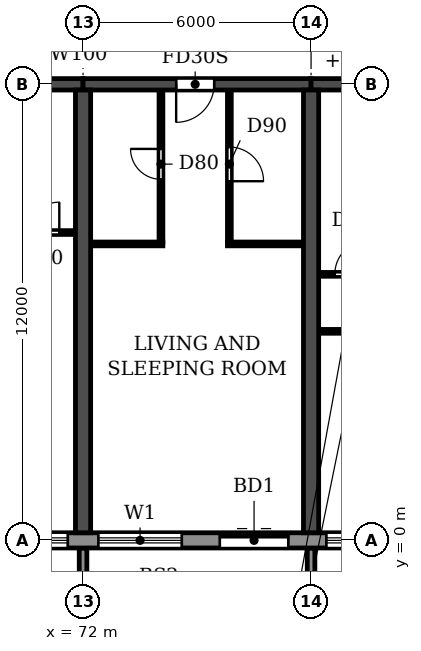
"""IFC4 building model, lengths in metres.
Left out: names, types, materials, properties, quantities, classifications, styles, units other than length and angle.
Written with IfcOpenShell. Run it as: python <this file> out.ifc"""

import sys

from ifc_helpers import new_model, si_unit, direction, frame, frame_2d, origin, place, context, subcontext, project, spatial, polyline, rectangle, outline, extrude, source, transform, mapped, element, fill, save


model = new_model("IFC4")
c1 = context("Model", 3, precision=1e-05, world=origin(), true_north=direction((0.0, 1.0)))
c2 = subcontext(c1, "Body", "Model", "MODEL_VIEW")
j1 = project(units=[si_unit("LENGTHUNIT", "METRE"), si_unit("PLANEANGLEUNIT", "RADIAN")], contexts=[c1])
p1 = place(None, origin())
s1 = spatial("IfcSite", under=j1, at=p1, CompositionType="ELEMENT")
p2 = place(p1, origin())
s2 = spatial("IfcBuilding", under=s1, at=p2, CompositionType="ELEMENT")
p3 = place(p2, frame((0.0, 0.0, 56.4)))
s3 = spatial("IfcBuildingStorey", under=s2, at=p3, CompositionType="ELEMENT", Elevation=56.4)
for number, where, z_axis, x_axis in (
    (1, (72.0, 0.2, 0.0), (0.0, 0.0, 1.0), (0.0, 1.0, 0.0)),
    (2, (78.0, 0.2, 0.0), (0.0, 0.0, 1.0), (0.0, 1.0, 0.0)),
):
    element("IfcWall", number, at=place(p3, frame(where, z_axis=z_axis, x_axis=x_axis)), inside=s3, PredefinedType="SHEAR", context=c2, shape_type="SweptSolid", body=[
        extrude(rectangle(XDim=11.65, YDim=0.4, at=frame_2d((5.825, 0.0))), origin(), (0.0, 0.0, 1.0), 3.05),
    ])
p4 = place(p3, frame((66.0, 12.0, 0.0), z_axis=(0.0, 0.0, 1.0), x_axis=(1.0, 0.0, 0.0)))
e3 = element("IfcWall", 3, at=p4, inside=s3, PredefinedType="SHEAR", context=c2, shape_type="SweptSolid", body=[
    extrude(rectangle(XDim=6.0, YDim=0.3, at=frame_2d((3.0, 0.0))), origin(), (0.0, 0.0, 1.0), 2.45),
])
p5 = place(p4, frame((2.55, 0.0, 0.0)))
e4 = element("IfcOpeningElement", 4, at=p5, cuts=e3, PredefinedType="OPENING", context=c2, shape_type="SweptSolid", body=[
    extrude(rectangle(XDim=1.0, YDim=2.1, at=frame_2d((0.5, 1.05))), frame((0.0, 0.16, 0.0), z_axis=(0.0, -1.0, 0.0), x_axis=(1.0, 0.0, 0.0)), (0.0, 0.0, 1.0), 0.32),
])
p6 = place(p3, frame((72.0, 12.0, 0.0), z_axis=(0.0, 0.0, 1.0), x_axis=(1.0, 0.0, 0.0)))
e5 = element("IfcWall", 5, at=p6, inside=s3, PredefinedType="SHEAR", context=c2, shape_type="SweptSolid", body=[
    extrude(rectangle(XDim=6.0, YDim=0.3, at=frame_2d((3.0, 0.0))), origin(), (0.0, 0.0, 1.0), 2.45),
])
p7 = place(p6, frame((2.45, 0.0, 0.0)))
e6 = element("IfcOpeningElement", 6, at=p7, cuts=e5, PredefinedType="OPENING", context=c2, shape_type="SweptSolid", body=[
    extrude(rectangle(XDim=1.0, YDim=2.1, at=frame_2d((0.5, 1.05))), frame((0.0, 0.16, 0.0), z_axis=(0.0, -1.0, 0.0), x_axis=(1.0, 0.0, 0.0)), (0.0, 0.0, 1.0), 0.32),
])
p8 = place(p3, frame((78.0, 12.0, 0.0), z_axis=(0.0, 0.0, 1.0), x_axis=(1.0, 0.0, 0.0)))
e7 = element("IfcWall", 7, at=p8, inside=s3, PredefinedType="SHEAR", context=c2, shape_type="SweptSolid", body=[
    extrude(rectangle(XDim=6.0, YDim=0.3, at=frame_2d((3.0, 0.0))), origin(), (0.0, 0.0, 1.0), 2.45),
])
p9 = place(p8, frame((2.55, 0.0, 0.0)))
e8 = element("IfcOpeningElement", 8, at=p9, cuts=e7, PredefinedType="OPENING", context=c2, shape_type="SweptSolid", body=[
    extrude(rectangle(XDim=1.0, YDim=2.1, at=frame_2d((0.5, 1.05))), frame((0.0, 0.16, 0.0), z_axis=(0.0, -1.0, 0.0), x_axis=(1.0, 0.0, 0.0)), (0.0, 0.0, 1.0), 0.32),
])
p10 = place(p3, frame((10.683, 0.0, 0.0), z_axis=(0.0, 0.0, 1.0), x_axis=(1.0, 0.0, 0.0)))
e9 = element("IfcWall", 9, at=p10, inside=s3, PredefinedType="STANDARD", context=c2, shape_type="SweptSolid", body=[
    extrude(rectangle(XDim=80.634, YDim=0.4, at=frame_2d((40.317, 0.0))), origin(), (0.0, 0.0, 1.0), 3.05),
])
p11 = place(p10, frame((1.717, 0.0, 0.9)))
e10 = element("IfcOpeningElement", 10, at=p11, cuts=e9, PredefinedType="OPENING", context=c2, shape_type="SweptSolid", body=[
    extrude(rectangle(XDim=2.2, YDim=1.5, at=frame_2d((1.1, 0.75))), frame((0.0, 0.21, 0.0), z_axis=(0.0, -1.0, 0.0), x_axis=(1.0, 0.0, 0.0)), (0.0, 0.0, 1.0), 0.42),
])
p12 = place(p10, frame((4.917, 0.0, 0.0)))
e11 = element("IfcOpeningElement", 11, at=p12, cuts=e9, PredefinedType="OPENING", context=c2, shape_type="SweptSolid", body=[
    extrude(rectangle(XDim=1.8, YDim=2.4, at=frame_2d((0.9, 1.2))), frame((0.0, 0.21, 0.0), z_axis=(0.0, -1.0, 0.0), x_axis=(1.0, 0.0, 0.0)), (0.0, 0.0, 1.0), 0.42),
])
p13 = place(p10, frame((7.717, 0.0, 0.9)))
e12 = element("IfcOpeningElement", 12, at=p13, cuts=e9, PredefinedType="OPENING", context=c2, shape_type="SweptSolid", body=[
    extrude(rectangle(XDim=2.2, YDim=1.5, at=frame_2d((1.1, 0.75))), frame((0.0, 0.21, 0.0), z_axis=(0.0, -1.0, 0.0), x_axis=(1.0, 0.0, 0.0)), (0.0, 0.0, 1.0), 0.42),
])
p14 = place(p10, frame((10.717, 0.0, 0.9)))
e13 = element("IfcOpeningElement", 13, at=p14, cuts=e9, PredefinedType="OPENING", context=c2, shape_type="SweptSolid", body=[
    extrude(rectangle(XDim=2.2, YDim=1.5, at=frame_2d((1.1, 0.75))), frame((0.0, 0.21, 0.0), z_axis=(0.0, -1.0, 0.0), x_axis=(1.0, 0.0, 0.0)), (0.0, 0.0, 1.0), 0.42),
])
p15 = place(p10, frame((13.717, 0.0, 0.9)))
e14 = element("IfcOpeningElement", 14, at=p15, cuts=e9, PredefinedType="OPENING", context=c2, shape_type="SweptSolid", body=[
    extrude(rectangle(XDim=2.2, YDim=1.5, at=frame_2d((1.1, 0.75))), frame((0.0, 0.21, 0.0), z_axis=(0.0, -1.0, 0.0), x_axis=(1.0, 0.0, 0.0)), (0.0, 0.0, 1.0), 0.42),
])
p16 = place(p10, frame((16.917, 0.0, 0.0)))
e15 = element("IfcOpeningElement", 15, at=p16, cuts=e9, PredefinedType="OPENING", context=c2, shape_type="SweptSolid", body=[
    extrude(rectangle(XDim=1.8, YDim=2.4, at=frame_2d((0.9, 1.2))), frame((0.0, 0.21, 0.0), z_axis=(0.0, -1.0, 0.0), x_axis=(1.0, 0.0, 0.0)), (0.0, 0.0, 1.0), 0.42),
])
p17 = place(p10, frame((19.717, 0.0, 0.9)))
e16 = element("IfcOpeningElement", 16, at=p17, cuts=e9, PredefinedType="OPENING", context=c2, shape_type="SweptSolid", body=[
    extrude(rectangle(XDim=2.2, YDim=1.5, at=frame_2d((1.1, 0.75))), frame((0.0, 0.21, 0.0), z_axis=(0.0, -1.0, 0.0), x_axis=(1.0, 0.0, 0.0)), (0.0, 0.0, 1.0), 0.42),
])
p18 = place(p10, frame((22.717, 0.0, 0.9)))
e17 = element("IfcOpeningElement", 17, at=p18, cuts=e9, PredefinedType="OPENING", context=c2, shape_type="SweptSolid", body=[
    extrude(rectangle(XDim=2.2, YDim=1.5, at=frame_2d((1.1, 0.75))), frame((0.0, 0.21, 0.0), z_axis=(0.0, -1.0, 0.0), x_axis=(1.0, 0.0, 0.0)), (0.0, 0.0, 1.0), 0.42),
])
p19 = place(p10, frame((25.917, 0.0, 0.0)))
e18 = element("IfcOpeningElement", 18, at=p19, cuts=e9, PredefinedType="OPENING", context=c2, shape_type="SweptSolid", body=[
    extrude(rectangle(XDim=1.8, YDim=2.4, at=frame_2d((0.9, 1.2))), frame((0.0, 0.21, 0.0), z_axis=(0.0, -1.0, 0.0), x_axis=(1.0, 0.0, 0.0)), (0.0, 0.0, 1.0), 0.42),
])
p20 = place(p10, frame((28.717, 0.0, 0.9)))
e19 = element("IfcOpeningElement", 19, at=p20, cuts=e9, PredefinedType="OPENING", context=c2, shape_type="SweptSolid", body=[
    extrude(rectangle(XDim=2.2, YDim=1.5, at=frame_2d((1.1, 0.75))), frame((0.0, 0.21, 0.0), z_axis=(0.0, -1.0, 0.0), x_axis=(1.0, 0.0, 0.0)), (0.0, 0.0, 1.0), 0.42),
])
p21 = place(p10, frame((31.717, 0.0, 0.9)))
e20 = element("IfcOpeningElement", 20, at=p21, cuts=e9, PredefinedType="OPENING", context=c2, shape_type="SweptSolid", body=[
    extrude(rectangle(XDim=2.2, YDim=1.5, at=frame_2d((1.1, 0.75))), frame((0.0, 0.21, 0.0), z_axis=(0.0, -1.0, 0.0), x_axis=(1.0, 0.0, 0.0)), (0.0, 0.0, 1.0), 0.42),
])
p22 = place(p10, frame((34.717, 0.0, 0.9)))
e21 = element("IfcOpeningElement", 21, at=p22, cuts=e9, PredefinedType="OPENING", context=c2, shape_type="SweptSolid", body=[
    extrude(rectangle(XDim=2.2, YDim=1.5, at=frame_2d((1.1, 0.75))), frame((0.0, 0.21, 0.0), z_axis=(0.0, -1.0, 0.0), x_axis=(1.0, 0.0, 0.0)), (0.0, 0.0, 1.0), 0.42),
])
p23 = place(p10, frame((37.717, 0.0, 0.9)))
e22 = element("IfcOpeningElement", 22, at=p23, cuts=e9, PredefinedType="OPENING", context=c2, shape_type="SweptSolid", body=[
    extrude(rectangle(XDim=2.2, YDim=1.5, at=frame_2d((1.1, 0.75))), frame((0.0, 0.21, 0.0), z_axis=(0.0, -1.0, 0.0), x_axis=(1.0, 0.0, 0.0)), (0.0, 0.0, 1.0), 0.42),
])
p24 = place(p10, frame((40.917, 0.0, 0.0)))
e23 = element("IfcOpeningElement", 23, at=p24, cuts=e9, PredefinedType="OPENING", context=c2, shape_type="SweptSolid", body=[
    extrude(rectangle(XDim=1.8, YDim=2.4, at=frame_2d((0.9, 1.2))), frame((0.0, 0.21, 0.0), z_axis=(0.0, -1.0, 0.0), x_axis=(1.0, 0.0, 0.0)), (0.0, 0.0, 1.0), 0.42),
])
p25 = place(p10, frame((43.717, 0.0, 0.9)))
e24 = element("IfcOpeningElement", 24, at=p25, cuts=e9, PredefinedType="OPENING", context=c2, shape_type="SweptSolid", body=[
    extrude(rectangle(XDim=2.2, YDim=1.5, at=frame_2d((1.1, 0.75))), frame((0.0, 0.21, 0.0), z_axis=(0.0, -1.0, 0.0), x_axis=(1.0, 0.0, 0.0)), (0.0, 0.0, 1.0), 0.42),
])
p26 = place(p10, frame((46.717, 0.0, 0.9)))
e25 = element("IfcOpeningElement", 25, at=p26, cuts=e9, PredefinedType="OPENING", context=c2, shape_type="SweptSolid", body=[
    extrude(rectangle(XDim=2.2, YDim=1.5, at=frame_2d((1.1, 0.75))), frame((0.0, 0.21, 0.0), z_axis=(0.0, -1.0, 0.0), x_axis=(1.0, 0.0, 0.0)), (0.0, 0.0, 1.0), 0.42),
])
p27 = place(p10, frame((49.717, 0.0, 0.9)))
e26 = element("IfcOpeningElement", 26, at=p27, cuts=e9, PredefinedType="OPENING", context=c2, shape_type="SweptSolid", body=[
    extrude(rectangle(XDim=2.2, YDim=1.5, at=frame_2d((1.1, 0.75))), frame((0.0, 0.21, 0.0), z_axis=(0.0, -1.0, 0.0), x_axis=(1.0, 0.0, 0.0)), (0.0, 0.0, 1.0), 0.42),
])
p28 = place(p10, frame((52.717, 0.0, 0.9)))
e27 = element("IfcOpeningElement", 27, at=p28, cuts=e9, PredefinedType="OPENING", context=c2, shape_type="SweptSolid", body=[
    extrude(rectangle(XDim=2.2, YDim=1.5, at=frame_2d((1.1, 0.75))), frame((0.0, 0.21, 0.0), z_axis=(0.0, -1.0, 0.0), x_axis=(1.0, 0.0, 0.0)), (0.0, 0.0, 1.0), 0.42),
])
p29 = place(p10, frame((55.717, 0.0, 0.9)))
e28 = element("IfcOpeningElement", 28, at=p29, cuts=e9, PredefinedType="OPENING", context=c2, shape_type="SweptSolid", body=[
    extrude(rectangle(XDim=2.2, YDim=1.5, at=frame_2d((1.1, 0.75))), frame((0.0, 0.21, 0.0), z_axis=(0.0, -1.0, 0.0), x_axis=(1.0, 0.0, 0.0)), (0.0, 0.0, 1.0), 0.42),
])
p30 = place(p10, frame((58.717, 0.0, 0.9)))
e29 = element("IfcOpeningElement", 29, at=p30, cuts=e9, PredefinedType="OPENING", context=c2, shape_type="SweptSolid", body=[
    extrude(rectangle(XDim=2.2, YDim=1.5, at=frame_2d((1.1, 0.75))), frame((0.0, 0.21, 0.0), z_axis=(0.0, -1.0, 0.0), x_axis=(1.0, 0.0, 0.0)), (0.0, 0.0, 1.0), 0.42),
])
p31 = place(p10, frame((61.717, 0.0, 0.9)))
e30 = element("IfcOpeningElement", 30, at=p31, cuts=e9, PredefinedType="OPENING", context=c2, shape_type="SweptSolid", body=[
    extrude(rectangle(XDim=2.2, YDim=1.5, at=frame_2d((1.1, 0.75))), frame((0.0, 0.21, 0.0), z_axis=(0.0, -1.0, 0.0), x_axis=(1.0, 0.0, 0.0)), (0.0, 0.0, 1.0), 0.42),
])
p32 = place(p10, frame((64.917, 0.0, 0.0)))
e31 = element("IfcOpeningElement", 31, at=p32, cuts=e9, PredefinedType="OPENING", context=c2, shape_type="SweptSolid", body=[
    extrude(rectangle(XDim=1.8, YDim=2.4, at=frame_2d((0.9, 1.2))), frame((0.0, 0.21, 0.0), z_axis=(0.0, -1.0, 0.0), x_axis=(1.0, 0.0, 0.0)), (0.0, 0.0, 1.0), 0.42),
])
p33 = place(p10, frame((67.717, 0.0, 0.9)))
e32 = element("IfcOpeningElement", 32, at=p33, cuts=e9, PredefinedType="OPENING", context=c2, shape_type="SweptSolid", body=[
    extrude(rectangle(XDim=2.2, YDim=1.5, at=frame_2d((1.1, 0.75))), frame((0.0, 0.21, 0.0), z_axis=(0.0, -1.0, 0.0), x_axis=(1.0, 0.0, 0.0)), (0.0, 0.0, 1.0), 0.42),
])
p34 = place(p10, frame((70.717, 0.0, 0.9)))
e33 = element("IfcOpeningElement", 33, at=p34, cuts=e9, PredefinedType="OPENING", context=c2, shape_type="SweptSolid", body=[
    extrude(rectangle(XDim=2.2, YDim=1.5, at=frame_2d((1.1, 0.75))), frame((0.0, 0.21, 0.0), z_axis=(0.0, -1.0, 0.0), x_axis=(1.0, 0.0, 0.0)), (0.0, 0.0, 1.0), 0.42),
])
p35 = place(p10, frame((73.717, 0.0, 0.9)))
e34 = element("IfcOpeningElement", 34, at=p35, cuts=e9, PredefinedType="OPENING", context=c2, shape_type="SweptSolid", body=[
    extrude(rectangle(XDim=2.2, YDim=1.5, at=frame_2d((1.1, 0.75))), frame((0.0, 0.21, 0.0), z_axis=(0.0, -1.0, 0.0), x_axis=(1.0, 0.0, 0.0)), (0.0, 0.0, 1.0), 0.42),
])
p36 = place(p10, frame((76.917, 0.0, 0.0)))
e35 = element("IfcOpeningElement", 35, at=p36, cuts=e9, PredefinedType="OPENING", context=c2, shape_type="SweptSolid", body=[
    extrude(rectangle(XDim=1.8, YDim=2.4, at=frame_2d((0.9, 1.2))), frame((0.0, 0.21, 0.0), z_axis=(0.0, -1.0, 0.0), x_axis=(1.0, 0.0, 0.0)), (0.0, 0.0, 1.0), 0.42),
])
m1 = source(origin(), c2, "Body", "SweptSolid", [
    extrude(outline(polyline([(0.0, 0.0), (0.2, 0.0), (0.2, 1.65), (0.0, 1.65), (0.0, 0.0)])), origin(), (0.0, 0.0, 1.0), 3.1),
])
for number, where in (
    (36, (71.9, -1.85, 0.0)),
    (37, (77.9, -1.85, 0.0)),
):
    element("IfcWall", number, at=place(p3, frame(where)), inside=s3, PredefinedType="STANDARD", context=c2, shape_type="MappedRepresentation", body=[
        mapped(m1, transform((0.0, 0.0, 0.0))),
    ])
p37 = place(p3, frame((78.21, 5.5, 0.0), z_axis=(0.0, 0.0, 1.0), x_axis=(1.0, 0.0, 0.0)))
e38 = element("IfcWall", 38, at=p37, inside=s3, PredefinedType="PARTITIONING", context=c2, shape_type="SweptSolid", body=[
    extrude(rectangle(XDim=2.84, YDim=0.1, at=frame_2d((1.42, 0.0))), origin(), (0.0, 0.0, 1.0), 3.05),
])
p38 = place(p37, frame((1.39, 0.0, 0.0)))
e39 = element("IfcOpeningElement", 39, at=p38, cuts=e38, PredefinedType="OPENING", context=c2, shape_type="SweptSolid", body=[
    extrude(rectangle(XDim=0.9, YDim=2.1, at=frame_2d((0.45, 1.05))), frame((0.0, 0.06, 0.0), z_axis=(0.0, -1.0, 0.0), x_axis=(1.0, 0.0, 0.0)), (0.0, 0.0, 1.0), 0.12),
])
p39 = place(p3, frame((78.21, 7.0, 0.0), z_axis=(0.0, 0.0, 1.0), x_axis=(1.0, 0.0, 0.0)))
e40 = element("IfcWall", 40, at=p39, inside=s3, PredefinedType="PARTITIONING", context=c2, shape_type="SweptSolid", body=[
    extrude(rectangle(XDim=1.99, YDim=0.1, at=frame_2d((0.995, 0.0))), origin(), (0.0, 0.0, 1.0), 3.05),
])
p40 = place(p39, frame((0.415, 0.0, 0.0)))
e41 = element("IfcOpeningElement", 41, at=p40, cuts=e40, PredefinedType="OPENING", context=c2, shape_type="SweptSolid", body=[
    extrude(rectangle(XDim=0.9, YDim=2.1, at=frame_2d((0.45, 1.05))), frame((0.0, 0.06, 0.0), z_axis=(0.0, -1.0, 0.0), x_axis=(1.0, 0.0, 0.0)), (0.0, 0.0, 1.0), 0.12),
])
p41 = place(p3, frame((72.21, 7.8, 0.0), z_axis=(0.0, 0.0, 1.0), x_axis=(1.0, 0.0, 0.0)))
e42 = element("IfcWall", 42, at=p41, inside=s3, PredefinedType="PARTITIONING", context=c2, shape_type="SweptSolid", body=[
    extrude(rectangle(XDim=1.89, YDim=0.1, at=frame_2d((0.945, 0.0))), origin(), (0.0, 0.0, 1.0), 3.05),
])
p42 = place(p3, frame((75.8, 7.8, 0.0), z_axis=(0.0, 0.0, 1.0), x_axis=(1.0, 0.0, 0.0)))
e43 = element("IfcWall", 43, at=p42, inside=s3, PredefinedType="PARTITIONING", context=c2, shape_type="SweptSolid", body=[
    extrude(rectangle(XDim=1.99, YDim=0.1, at=frame_2d((0.995, 0.0))), origin(), (0.0, 0.0, 1.0), 3.05),
])
p43 = place(p3, frame((69.9, 8.1, 0.0), z_axis=(0.0, 0.0, 1.0), x_axis=(1.0, 0.0, 0.0)))
e44 = element("IfcWall", 44, at=p43, inside=s3, PredefinedType="PARTITIONING", context=c2, shape_type="SweptSolid", body=[
    extrude(rectangle(XDim=1.89, YDim=0.1, at=frame_2d((0.945, 0.0))), origin(), (0.0, 0.0, 1.0), 3.05),
])
p44 = place(p43, frame((0.675, 0.0, 0.0)))
e45 = element("IfcOpeningElement", 45, at=p44, cuts=e44, PredefinedType="OPENING", context=c2, shape_type="SweptSolid", body=[
    extrude(rectangle(XDim=0.8, YDim=2.1, at=frame_2d((0.4, 1.05))), frame((0.0, 0.06, 0.0), z_axis=(0.0, -1.0, 0.0), x_axis=(1.0, 0.0, 0.0)), (0.0, 0.0, 1.0), 0.12),
])
p45 = place(p3, frame((74.05, 7.85, 0.0), z_axis=(0.0, 0.0, 1.0), x_axis=(0.0, 1.0, 0.0)))
e46 = element("IfcWall", 46, at=p45, inside=s3, PredefinedType="PARTITIONING", context=c2, shape_type="SweptSolid", body=[
    extrude(rectangle(XDim=3.99, YDim=0.1, at=frame_2d((1.995, 0.0))), origin(), (0.0, 0.0, 1.0), 3.05),
])
p46 = place(p45, frame((1.65, 0.0, 0.0)))
e47 = element("IfcOpeningElement", 47, at=p46, cuts=e46, PredefinedType="OPENING", context=c2, shape_type="SweptSolid", body=[
    extrude(rectangle(XDim=0.8, YDim=2.1, at=frame_2d((0.4, 1.05))), frame((0.0, 0.06, 0.0), z_axis=(0.0, -1.0, 0.0), x_axis=(1.0, 0.0, 0.0)), (0.0, 0.0, 1.0), 0.12),
])
p47 = place(p3, frame((75.85, 7.85, 0.0), z_axis=(0.0, 0.0, 1.0), x_axis=(0.0, 1.0, 0.0)))
e48 = element("IfcWall", 48, at=p47, inside=s3, PredefinedType="PARTITIONING", context=c2, shape_type="SweptSolid", body=[
    extrude(rectangle(XDim=3.99, YDim=0.1, at=frame_2d((1.995, 0.0))), origin(), (0.0, 0.0, 1.0), 3.05),
])
p48 = place(p47, frame((1.6, 0.0, 0.0)))
e49 = element("IfcOpeningElement", 49, at=p48, cuts=e48, PredefinedType="OPENING", context=c2, shape_type="SweptSolid", body=[
    extrude(rectangle(XDim=0.9, YDim=2.1, at=frame_2d((0.45, 1.05))), frame((0.0, 0.06, 0.0), z_axis=(0.0, -1.0, 0.0), x_axis=(1.0, 0.0, 0.0)), (0.0, 0.0, 1.0), 0.12),
])
p49 = place(p30, origin())
e50 = element("IfcWindow", 50, at=p49, inside=s3, PartitioningType="DOUBLE_PANEL_HORIZONTAL", PredefinedType="WINDOW", context=c2, shape_type="SweptSolid", body=[
    extrude(rectangle(XDim=2.2, YDim=1.5, at=frame_2d((1.1, 0.75))), frame((0.0, 0.03, 0.0), z_axis=(0.0, -1.0, 0.0), x_axis=(1.0, 0.0, 0.0)), (0.0, 0.0, 1.0), 0.06),
])
fill(e29, e50)
p50 = place(p31, origin())
e51 = element("IfcWindow", 51, at=p50, inside=s3, PartitioningType="DOUBLE_PANEL_HORIZONTAL", PredefinedType="WINDOW", context=c2, shape_type="SweptSolid", body=[
    extrude(rectangle(XDim=2.2, YDim=1.5, at=frame_2d((1.1, 0.75))), frame((0.0, 0.03, 0.0), z_axis=(0.0, -1.0, 0.0), x_axis=(1.0, 0.0, 0.0)), (0.0, 0.0, 1.0), 0.06),
])
fill(e30, e51)
p51 = place(p32, origin())
e52 = element("IfcDoor", 52, at=p51, inside=s3, OperationType="DOUBLE_DOOR_SLIDING", PredefinedType="DOOR", context=c2, shape_type="SweptSolid", body=[
    extrude(rectangle(XDim=1.8, YDim=2.4, at=frame_2d((0.9, 1.2))), frame((0.0, 0.025, 0.0), z_axis=(0.0, -1.0, 0.0), x_axis=(1.0, 0.0, 0.0)), (0.0, 0.0, 1.0), 0.05),
])
fill(e31, e52)
p52 = place(p33, origin())
e53 = element("IfcWindow", 53, at=p52, inside=s3, PartitioningType="DOUBLE_PANEL_HORIZONTAL", PredefinedType="WINDOW", context=c2, shape_type="SweptSolid", body=[
    extrude(rectangle(XDim=2.2, YDim=1.5, at=frame_2d((1.1, 0.75))), frame((0.0, 0.03, 0.0), z_axis=(0.0, -1.0, 0.0), x_axis=(1.0, 0.0, 0.0)), (0.0, 0.0, 1.0), 0.06),
])
fill(e32, e53)
p53 = place(p44, origin())
e54 = element("IfcDoor", 54, at=p53, inside=s3, OperationType="SINGLE_SWING_RIGHT", PredefinedType="DOOR", context=c2, shape_type="SweptSolid", body=[
    extrude(rectangle(XDim=0.8, YDim=2.1, at=frame_2d((0.4, 1.05))), frame((0.0, 0.025, 0.0), z_axis=(0.0, -1.0, 0.0), x_axis=(1.0, 0.0, 0.0)), (0.0, 0.0, 1.0), 0.05),
])
fill(e45, e54)
p54 = place(p46, origin())
e55 = element("IfcDoor", 55, at=p54, inside=s3, OperationType="SINGLE_SWING_RIGHT", PredefinedType="DOOR", context=c2, shape_type="SweptSolid", body=[
    extrude(rectangle(XDim=0.8, YDim=2.1, at=frame_2d((0.4, 1.05))), frame((0.0, 0.025, 0.0), z_axis=(0.0, -1.0, 0.0), x_axis=(1.0, 0.0, 0.0)), (0.0, 0.0, 1.0), 0.05),
])
fill(e47, e55)
p55 = place(p7, frame((1.0, 0.0, 0.0), z_axis=(0.0, 0.0, 1.0), x_axis=(-1.0, 0.0, 0.0)))
e56 = element("IfcDoor", 56, at=p55, inside=s3, OperationType="SINGLE_SWING_RIGHT", PredefinedType="DOOR", context=c2, shape_type="SweptSolid", body=[
    extrude(rectangle(XDim=1.0, YDim=2.1, at=frame_2d((0.5, 1.05))), frame((0.0, 0.025, 0.0), z_axis=(0.0, -1.0, 0.0), x_axis=(1.0, 0.0, 0.0)), (0.0, 0.0, 1.0), 0.05),
])
fill(e6, e56)
p56 = place(p48, frame((0.9, 0.0, 0.0), z_axis=(0.0, 0.0, 1.0), x_axis=(-1.0, 0.0, 0.0)))
e57 = element("IfcDoor", 57, at=p56, inside=s3, OperationType="SINGLE_SWING_RIGHT", PredefinedType="DOOR", context=c2, shape_type="SweptSolid", body=[
    extrude(rectangle(XDim=0.9, YDim=2.1, at=frame_2d((0.45, 1.05))), frame((0.0, 0.025, 0.0), z_axis=(0.0, -1.0, 0.0), x_axis=(1.0, 0.0, 0.0)), (0.0, 0.0, 1.0), 0.05),
])
fill(e49, e57)
p57 = place(p40, origin())
e58 = element("IfcDoor", 58, at=p57, inside=s3, OperationType="SINGLE_SWING_RIGHT", PredefinedType="DOOR", context=c2, shape_type="SweptSolid", body=[
    extrude(rectangle(XDim=0.9, YDim=2.1, at=frame_2d((0.45, 1.05))), frame((0.0, 0.025, 0.0), z_axis=(0.0, -1.0, 0.0), x_axis=(1.0, 0.0, 0.0)), (0.0, 0.0, 1.0), 0.05),
])
fill(e41, e58)
save(model, sys.argv[1])
